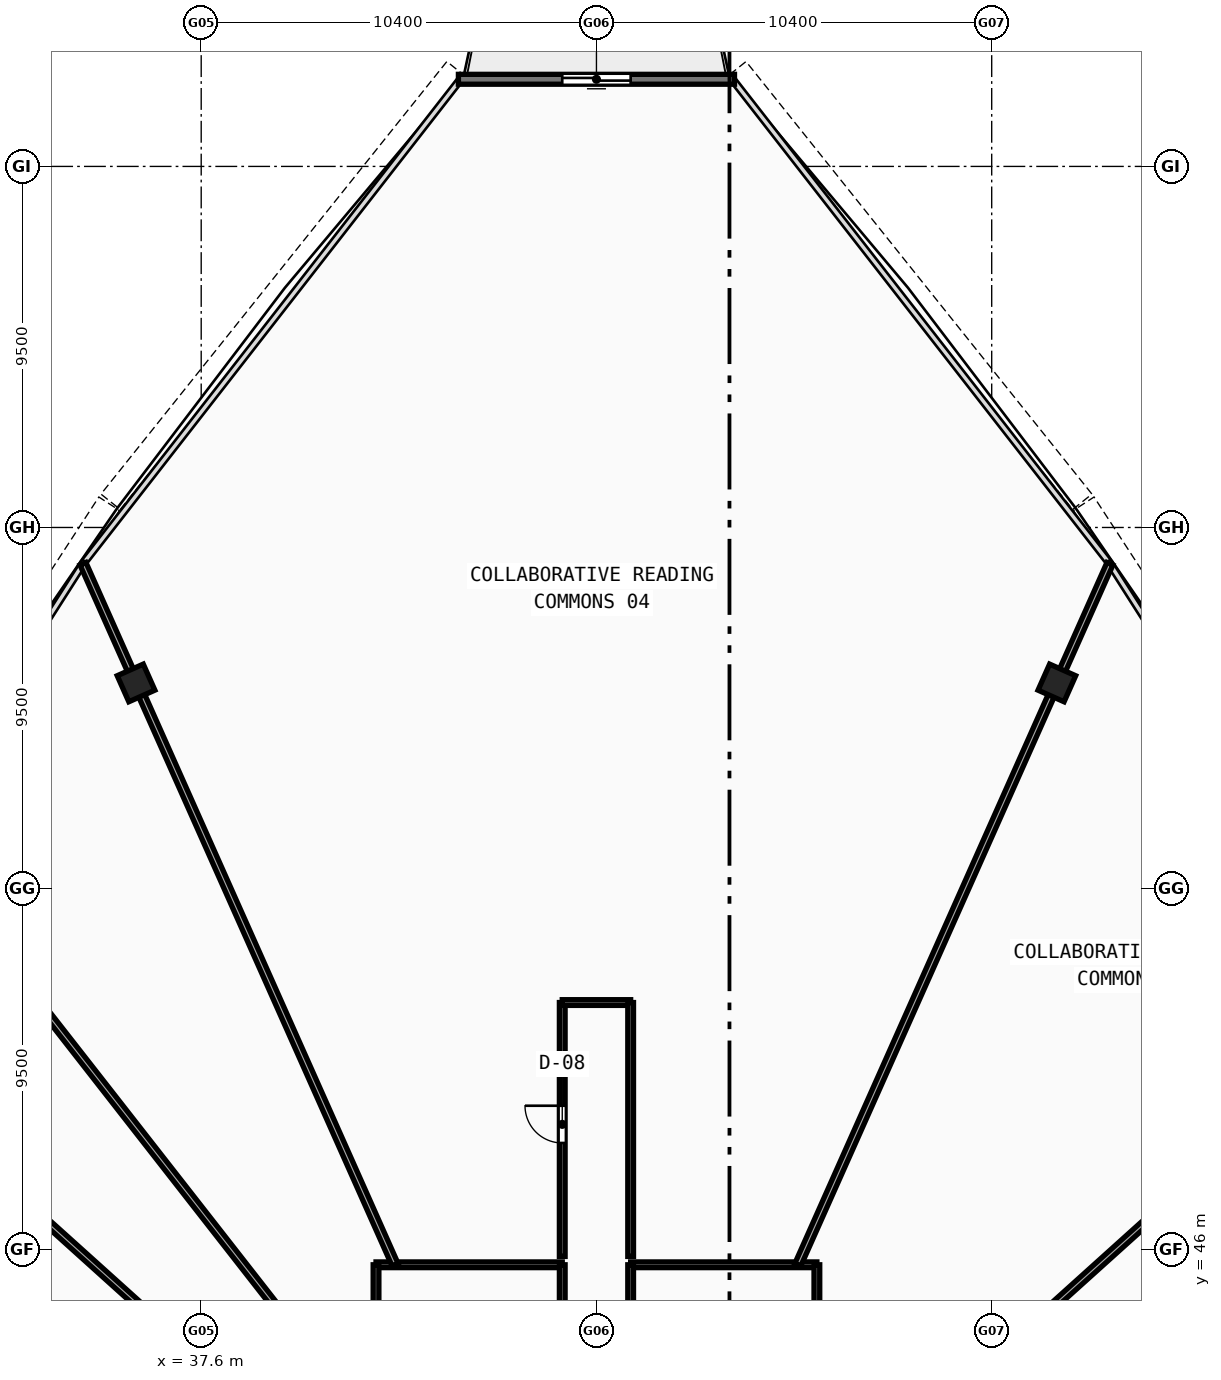
"""IFC4 building model, lengths in metres.
Left out: names, types, materials, properties, quantities, classifications, styles, units other than length and angle.
Written with IfcOpenShell. Run it as: python <this file> out.ifc"""

import sys

from ifc_helpers import new_model, si_unit, direction, frame, frame_2d, origin, origin_with_axes, origin_2d, place, context, subcontext, project, spatial, rectangle, hollow_rectangle, extrude, source, transform, mapped, element, fill, save


model = new_model("IFC4")
c1 = context("Model", 3, precision=1e-05, world=origin(), true_north=direction((0.0, 1.0)))
c2 = subcontext(c1, "Body", "Model", "MODEL_VIEW")
j1 = project(units=[si_unit("LENGTHUNIT", "METRE"), si_unit("PLANEANGLEUNIT", "RADIAN")], contexts=[c1])
p1 = place(None, origin())
s1 = spatial("IfcSite", under=j1, at=p1, CompositionType="ELEMENT")
p2 = place(p1, origin())
s2 = spatial("IfcBuilding", under=s1, at=p2, CompositionType="ELEMENT")
p3 = place(p2, frame((0.0, 0.0, 285.02)))
s3 = spatial("IfcBuildingStorey", under=s2, at=p3, CompositionType="ELEMENT", Elevation=285.02)
m1 = source(origin(), c2, "Body", "SweptSolid", [
    extrude(hollow_rectangle(XDim=0.75, YDim=0.75, WallThickness=0.028, at=origin_2d()), origin(), (0.0, 0.0, 1.0), 3.73),
])
for number, where, z_axis, x_axis in (
    (1, (60.114, 60.909, -0.26), (0.0, 0.0, 1.0), (-0.914, 0.407, 0.0)),
    (2, (35.886, 60.909, -0.26), (0.0, 0.0, 1.0), (-0.914, -0.407, 0.0)),
):
    element("IfcColumn", number, at=place(p3, frame(where, z_axis=z_axis, x_axis=x_axis)), inside=s3, PredefinedType="COLUMN", context=c2, shape_type="MappedRepresentation", body=[
        mapped(m1, transform((0.0, 0.0, 0.0), scale=1.0)),
    ])
p4 = place(p3, frame((51.632, 76.793, 0.0), z_axis=(0.0, 0.0, 1.0), x_axis=(-1.0, 0.0, 0.0)))
e3 = element("IfcWall", 3, at=p4, inside=s3, PredefinedType="STANDARD", context=c2, shape_type="SweptSolid", body=[
    extrude(rectangle(XDim=7.264, YDim=0.26, at=frame_2d((3.632, 0.0))), origin(), (0.0, 0.0, 1.0), 3.47),
])
p5 = place(p4, frame((2.732, 0.0, 0.0)))
e4 = element("IfcOpeningElement", 4, at=p5, cuts=e3, PredefinedType="OPENING", context=c2, shape_type="SweptSolid", body=[
    extrude(rectangle(XDim=1.8, YDim=2.15, at=frame_2d((0.9, 1.075))), frame((0.0, 0.14, 0.0), z_axis=(0.0, -1.0, 0.0), x_axis=(1.0, 0.0, 0.0)), (0.0, 0.0, 1.0), 0.28),
])
p6 = place(p3, frame((42.2, 45.6, 0.0), z_axis=(0.0, 0.0, 1.0), x_axis=(1.0, 0.0, 0.0)))
e5 = element("IfcWall", 5, at=p6, inside=s3, PredefinedType="PARTITIONING", context=c2, shape_type="SweptSolid", body=[
    extrude(rectangle(XDim=4.9, YDim=0.15, at=frame_2d((2.45, 0.0))), origin(), (0.0, 0.0, 1.0), 2.87),
])
for number, where, z_axis, x_axis in (
    (6, (42.2, 42.2, 0.0), (0.0, 0.0, 1.0), (0.0, 1.0, 0.0)),
    (7, (47.1, 42.2, 0.0), (0.0, 0.0, 1.0), (0.0, 1.0, 0.0)),
):
    element("IfcWall", number, at=place(p3, frame(where, z_axis=z_axis, x_axis=x_axis)), inside=s3, PredefinedType="PARTITIONING", context=c2, shape_type="SweptSolid", body=[
        extrude(rectangle(XDim=3.4, YDim=0.15, at=frame_2d((1.7, 0.0))), origin(), (0.0, 0.0, 1.0), 3.47),
    ])
p7 = place(p3, frame((48.9, 45.6, 0.0), z_axis=(0.0, 0.0, 1.0), x_axis=(1.0, 0.0, 0.0)))
e8 = element("IfcWall", 8, at=p7, inside=s3, PredefinedType="PARTITIONING", context=c2, shape_type="SweptSolid", body=[
    extrude(rectangle(XDim=4.9, YDim=0.15, at=frame_2d((2.45, 0.0))), origin(), (0.0, 0.0, 1.0), 2.87),
])
for number, where, z_axis, x_axis in (
    (9, (48.9, 42.2, 0.0), (0.0, 0.0, 1.0), (0.0, 1.0, 0.0)),
    (10, (53.8, 42.2, 0.0), (0.0, 0.0, 1.0), (0.0, 1.0, 0.0)),
):
    element("IfcWall", number, at=place(p3, frame(where, z_axis=z_axis, x_axis=x_axis)), inside=s3, PredefinedType="PARTITIONING", context=c2, shape_type="SweptSolid", body=[
        extrude(rectangle(XDim=3.4, YDim=0.15, at=frame_2d((1.7, 0.0))), origin(), (0.0, 0.0, 1.0), 3.47),
    ])
p8 = place(p3, frame((57.44, 42.2, 0.0), z_axis=(0.0, 0.0, 1.0), x_axis=(0.743145118403, 0.669130281032, 0.0)))
e11 = element("IfcWall", 11, at=p8, inside=s3, PredefinedType="PARTITIONING", context=c2, shape_type="SweptSolid", body=[
    extrude(rectangle(XDim=15.397, YDim=0.17, at=frame_2d((7.699, 0.0))), origin(), (0.0, 0.0, 1.0), 2.87),
])
for number, where, z_axis, x_axis in (
    (12, (53.298, 45.6, 0.0), (0.0, 0.0, 1.0), (0.407, 0.914, 0.0)),
    (13, (42.702, 45.6, 0.0), (0.0, 0.0, 1.0), (-0.407, 0.914, 0.0)),
):
    element("IfcWall", number, at=place(p3, frame(where, z_axis=z_axis, x_axis=x_axis)), inside=s3, PredefinedType="PARTITIONING", context=c2, shape_type="SweptSolid", body=[
        extrude(rectangle(XDim=20.191, YDim=0.17, at=frame_2d((10.096, 0.0))), origin(), (0.0, 0.0, 1.0), 2.87),
    ])
p9 = place(p3, frame((41.359, 42.2, 0.0), z_axis=(0.0, 0.0, 1.0), x_axis=(-0.615658553978, 0.788013036005, 0.0)))
e14 = element("IfcWall", 14, at=p9, inside=s3, PredefinedType="PARTITIONING", context=c2, shape_type="SweptSolid", body=[
    extrude(rectangle(XDim=18.609, YDim=0.17, at=frame_2d((9.304, 0.0))), origin(), (0.0, 0.0, 1.0), 2.87),
])
p10 = place(p3, frame((38.56, 42.2, 0.0), z_axis=(0.0, 0.0, 1.0), x_axis=(-0.743145118403, 0.669130281032, 0.0)))
e15 = element("IfcWall", 15, at=p10, inside=s3, PredefinedType="PARTITIONING", context=c2, shape_type="SweptSolid", body=[
    extrude(rectangle(XDim=15.397, YDim=0.17, at=frame_2d((7.699, 0.0))), origin(), (0.0, 0.0, 1.0), 2.87),
])
p11 = place(p3, frame((47.1, 45.82, 0.0), z_axis=(0.0, 0.0, 1.0), x_axis=(0.0, 1.0, 0.0)))
e16 = element("IfcWall", 16, at=p11, inside=s3, PredefinedType="PARTITIONING", context=c2, shape_type="SweptSolid", body=[
    extrude(rectangle(XDim=6.68, YDim=0.15, at=frame_2d((3.34, 0.0))), origin(), (0.0, 0.0, 1.0), 3.12),
])
p12 = place(p11, frame((2.985, 0.0, 0.0)))
e17 = element("IfcOpeningElement", 17, at=p12, cuts=e16, PredefinedType="OPENING", context=c2, shape_type="SweptSolid", body=[
    extrude(rectangle(XDim=0.98, YDim=2.12, at=frame_2d((0.49, 1.06))), frame((0.0, 0.085, 0.0), z_axis=(0.0, -1.0, 0.0), x_axis=(1.0, 0.0, 0.0)), (0.0, 0.0, 1.0), 0.17),
])
p13 = place(p3, frame((47.1, 52.5, 0.0), z_axis=(0.0, 0.0, 1.0), x_axis=(1.0, 0.0, 0.0)))
e18 = element("IfcWall", 18, at=p13, inside=s3, PredefinedType="PARTITIONING", context=c2, shape_type="SweptSolid", body=[
    extrude(rectangle(XDim=1.8, YDim=0.15, at=frame_2d((0.9, 0.0))), origin(), (0.0, 0.0, 1.0), 3.47),
])
p14 = place(p3, frame((48.9, 52.5, 0.0), z_axis=(0.0, 0.0, 1.0), x_axis=(0.0, -1.0, 0.0)))
e19 = element("IfcWall", 19, at=p14, inside=s3, PredefinedType="PARTITIONING", context=c2, shape_type="SweptSolid", body=[
    extrude(rectangle(XDim=6.68, YDim=0.15, at=frame_2d((3.34, 0.0))), origin(), (0.0, 0.0, 1.0), 3.12),
])
m2 = source(origin(), c2, "Body", "SweptSolid", [
    extrude(rectangle(XDim=1.8, YDim=2.15, at=frame_2d((0.9, 1.075))), frame((0.0, 0.025, 0.0), z_axis=(0.0, -1.0, 0.0), x_axis=(1.0, 0.0, 0.0)), (0.0, 0.0, 1.0), 0.05),
])
p15 = place(p5, origin_with_axes())
e20 = element("IfcDoor", 20, at=p15, inside=s3, OperationType="DOUBLE_DOOR_SLIDING", PredefinedType="DOOR", context=c2, shape_type="MappedRepresentation", body=[
    mapped(m2, transform((0.0, 0.0, 0.0), scale=1.0)),
])
fill(e4, e20)
m3 = source(origin(), c2, "Body", "SweptSolid", [
    extrude(rectangle(XDim=0.98, YDim=2.12, at=frame_2d((0.49, 1.06))), frame((0.0, 0.025, 0.0), z_axis=(0.0, -1.0, 0.0), x_axis=(1.0, 0.0, 0.0)), (0.0, 0.0, 1.0), 0.05),
])
p16 = place(p12, origin_with_axes())
e21 = element("IfcDoor", 21, at=p16, inside=s3, OperationType="SINGLE_SWING_RIGHT", PredefinedType="DOOR", context=c2, shape_type="MappedRepresentation", body=[
    mapped(m3, transform((0.0, 0.0, 0.0), scale=1.0)),
])
fill(e17, e21)
save(model, sys.argv[1])
